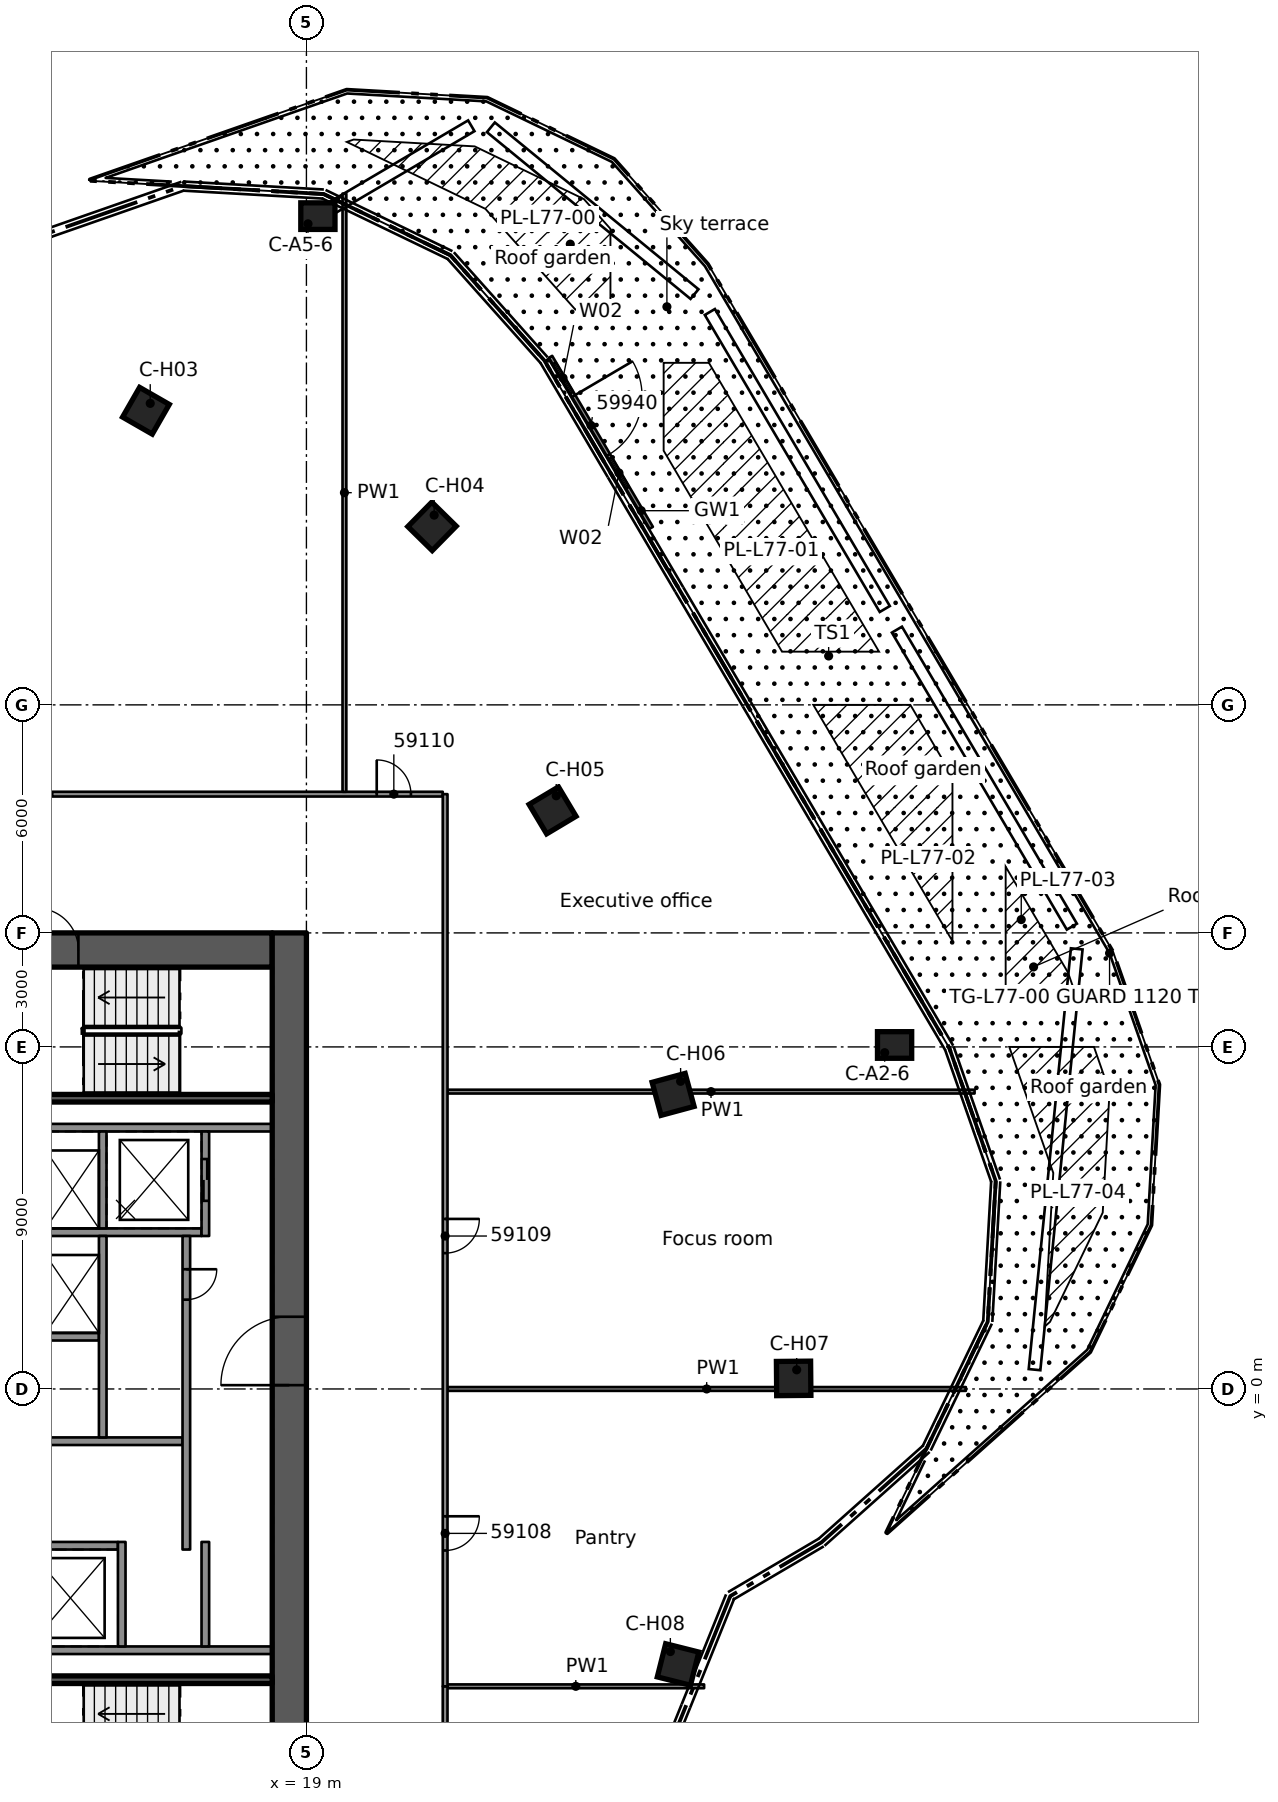
"""IFC4 building model, lengths in metres.
Left out: names, types, materials, properties, quantities, classifications, styles, units other than length and angle.
Written with IfcOpenShell. Run it as: python <this file> out.ifc"""

import sys

from ifc_helpers import new_model, si_unit, direction, frame, frame_2d, origin, origin_2d, place, context, subcontext, project, spatial, rectangle, extrude, element, fill, save


model = new_model("IFC4")
c1 = context("Model", 3, precision=1e-05, world=origin(), true_north=direction((0.0, 1.0)))
c2 = subcontext(c1, "Body", "Model", "MODEL_VIEW")
j1 = project(units=[si_unit("LENGTHUNIT", "METRE"), si_unit("PLANEANGLEUNIT", "RADIAN")], contexts=[c1])
p1 = place(None, origin())
s1 = spatial("IfcSite", under=j1, at=p1, CompositionType="ELEMENT")
p2 = place(p1, origin())
s2 = spatial("IfcBuilding", under=s1, at=p2, CompositionType="ELEMENT")
p3 = place(p2, frame((0.0, 0.0, 289.4)))
s3 = spatial("IfcBuildingStorey", under=s2, at=p3, CompositionType="ELEMENT", Elevation=289.4)
p4 = place(p3, frame((8.9, 11.55, 0.0), z_axis=(0.0, 0.0, 1.0), x_axis=(1.0, 0.0, 0.0)))
e1 = element("IfcWall", 1, at=p4, inside=s3, PredefinedType="SHEAR", context=c2, shape_type="SweptSolid", body=[
    extrude(rectangle(XDim=9.2, YDim=0.9, at=frame_2d((4.6, 0.0))), origin(), (0.0, 0.0, 1.0), 3.5),
])
p5 = place(p4, frame((3.0, 0.0, 0.0)))
e2 = element("IfcOpeningElement", 2, at=p5, cuts=e1, PredefinedType="OPENING", context=c2, shape_type="SweptSolid", body=[
    extrude(rectangle(XDim=1.1, YDim=2.1, at=frame_2d((0.55, 1.05))), frame((0.0, 0.46, 0.0), z_axis=(0.0, -1.0, 0.0), x_axis=(1.0, 0.0, 0.0)), (0.0, 0.0, 1.0), 0.92),
])
p6 = place(p4, frame((0.77, 0.0, 0.0)))
e3 = element("IfcOpeningElement", 3, at=p6, cuts=e1, PredefinedType="OPENING", context=c2, shape_type="SweptSolid", body=[
    extrude(rectangle(XDim=0.9, YDim=2.1, at=frame_2d((0.45, 1.05))), frame((0.0, 0.46, 0.0), z_axis=(0.0, -1.0, 0.0), x_axis=(1.0, 0.0, 0.0)), (0.0, 0.0, 1.0), 0.92),
])
p7 = place(p3, frame((18.55, -12.0, 0.0), z_axis=(0.0, 0.0, 1.0), x_axis=(0.0, 1.0, 0.0)))
e4 = element("IfcWall", 4, at=p7, inside=s3, PredefinedType="SHEAR", context=c2, shape_type="SweptSolid", body=[
    extrude(rectangle(XDim=24.0, YDim=0.9, at=frame_2d((12.0, 0.0))), origin(), (0.0, 0.0, 1.0), 3.5),
])
p8 = place(p7, frame((12.1, 0.0, 0.0)))
e5 = element("IfcOpeningElement", 5, at=p8, cuts=e4, PredefinedType="OPENING", context=c2, shape_type="SweptSolid", body=[
    extrude(rectangle(XDim=1.8, YDim=2.1, at=frame_2d((0.9, 1.05))), frame((0.0, 0.46, 0.0), z_axis=(0.0, -1.0, 0.0), x_axis=(1.0, 0.0, 0.0)), (0.0, 0.0, 1.0), 0.92),
])
for number, where, z_axis, x_axis in (
    (6, (34.477, 9.051, 0.0), (0.0, 0.0, 1.0), (1.0, 0.0, 0.0)),
    (7, (19.302, 30.86, 0.0), (0.0, 0.0, 1.0), (1.0, 0.0, 0.0)),
):
    element("IfcColumn", number, at=place(p3, frame(where, z_axis=z_axis, x_axis=x_axis)), inside=s3, PredefinedType="COLUMN", context=c2, shape_type="SweptSolid", body=[
        extrude(rectangle(XDim=0.9, YDim=0.7, at=origin_2d()), origin(), (0.0, 0.0, 1.0), 3.5),
    ])
for number, where, z_axis, x_axis in (
    (8, (14.777, 25.739, 0.0), (0.0, 0.0, 1.0), (0.498, 0.867, 0.0)),
    (9, (22.305, 22.697, 0.0), (0.0, 0.0, 1.0), (0.701, 0.713, 0.0)),
    (10, (25.477, 15.224, 0.0), (0.0, 0.0, 1.0), (0.858, 0.513, 0.0)),
    (11, (28.649, 7.751, 0.0), (0.0, 0.0, 1.0), (0.965, 0.261, 0.0)),
    (12, (31.821, 0.278, 0.0), (0.0, 0.0, 1.0), (1.0, 0.009, 0.0)),
    (13, (28.78, -7.25, 0.0), (0.0, 0.0, 1.0), (0.97, -0.244, 0.0)),
):
    element("IfcColumn", number, at=place(p3, frame(where, z_axis=z_axis, x_axis=x_axis)), inside=s3, PredefinedType="COLUMN", context=c2, shape_type="SweptSolid", body=[
        extrude(rectangle(XDim=0.9, YDim=0.9, at=origin_2d()), origin(), (0.0, 0.0, 1.0), 3.5),
    ])
for number, where, z_axis, x_axis in (
    (14, (11.54, -6.875, 0.0), (0.0, 0.0, 1.0), (1.0, 0.0, 0.0)),
    (15, (11.54, 6.875, 0.0), (0.0, 0.0, 1.0), (1.0, 0.0, 0.0)),
):
    element("IfcWall", number, at=place(p3, frame(where, z_axis=z_axis, x_axis=x_axis)), inside=s3, PredefinedType="SOLIDWALL", context=c2, shape_type="SweptSolid", body=[
        extrude(rectangle(XDim=6.56, YDim=0.2, at=frame_2d((3.28, 0.0))), origin(), (0.0, 0.0, 1.0), 3.09),
    ])
p9 = place(p3, frame((11.54, 4.125, 0.0), z_axis=(0.0, 0.0, 1.0), x_axis=(1.0, 0.0, 0.0)))
e16 = element("IfcWall", 16, at=p9, inside=s3, PredefinedType="SOLIDWALL", context=c2, shape_type="SweptSolid", body=[
    extrude(rectangle(XDim=4.7, YDim=0.2, at=frame_2d((2.35, 0.0))), origin(), (0.0, 0.0, 1.0), 3.09),
])
p10 = place(p3, frame((11.54, 1.375, 0.0), z_axis=(0.0, 0.0, 1.0), x_axis=(1.0, 0.0, 0.0)))
e17 = element("IfcWall", 17, at=p10, inside=s3, PredefinedType="SOLIDWALL", context=c2, shape_type="SweptSolid", body=[
    extrude(rectangle(XDim=2.0, YDim=0.2, at=frame_2d((1.0, 0.0))), origin(), (0.0, 0.0, 1.0), 3.09),
])
p11 = place(p3, frame((11.54, -1.375, 0.0), z_axis=(0.0, 0.0, 1.0), x_axis=(1.0, 0.0, 0.0)))
e18 = element("IfcWall", 18, at=p11, inside=s3, PredefinedType="SOLIDWALL", context=c2, shape_type="SweptSolid", body=[
    extrude(rectangle(XDim=4.2, YDim=0.2, at=frame_2d((2.1, 0.0))), origin(), (0.0, 0.0, 1.0), 3.09),
])
p12 = place(p3, frame((11.54, -4.125, 0.0), z_axis=(0.0, 0.0, 1.0), x_axis=(1.0, 0.0, 0.0)))
e19 = element("IfcWall", 19, at=p12, inside=s3, PredefinedType="SOLIDWALL", context=c2, shape_type="SweptSolid", body=[
    extrude(rectangle(XDim=2.5, YDim=0.2, at=frame_2d((1.25, 0.0))), origin(), (0.0, 0.0, 1.0), 3.09),
])
p13 = place(p3, frame((13.64, 6.775, 0.0), z_axis=(0.0, 0.0, 1.0), x_axis=(0.0, -1.0, 0.0)))
e20 = element("IfcWall", 20, at=p13, inside=s3, PredefinedType="SOLIDWALL", context=c2, shape_type="SweptSolid", body=[
    extrude(rectangle(XDim=2.55, YDim=0.2, at=frame_2d((1.275, 0.0))), origin(), (0.0, 0.0, 1.0), 3.09),
])
p14 = place(p3, frame((13.64, 4.025, 0.0), z_axis=(0.0, 0.0, 1.0), x_axis=(0.0, -1.0, 0.0)))
e21 = element("IfcWall", 21, at=p14, inside=s3, PredefinedType="SOLIDWALL", context=c2, shape_type="SweptSolid", body=[
    extrude(rectangle(XDim=5.3, YDim=0.2, at=frame_2d((2.65, 0.0))), origin(), (0.0, 0.0, 1.0), 3.09),
])
p15 = place(p3, frame((14.14, -4.025, 0.0), z_axis=(0.0, 0.0, 1.0), x_axis=(0.0, -1.0, 0.0)))
e22 = element("IfcWall", 22, at=p15, inside=s3, PredefinedType="SOLIDWALL", context=c2, shape_type="SweptSolid", body=[
    extrude(rectangle(XDim=2.75, YDim=0.2, at=frame_2d((1.375, 0.0))), origin(), (0.0, 0.0, 1.0), 3.09),
])
p16 = place(p3, frame((16.34, 6.775, 0.0), z_axis=(0.0, 0.0, 1.0), x_axis=(0.0, -1.0, 0.0)))
e23 = element("IfcWall", 23, at=p16, inside=s3, PredefinedType="SOLIDWALL", context=c2, shape_type="SweptSolid", body=[
    extrude(rectangle(XDim=2.75, YDim=0.2, at=frame_2d((1.375, 0.0))), origin(), (0.0, 0.0, 1.0), 3.09),
])
p17 = place(p16, frame((0.725, 0.0, 0.0)))
e24 = element("IfcOpeningElement", 24, at=p17, cuts=e23, PredefinedType="OPENING", context=c2, shape_type="SweptSolid", body=[
    extrude(rectangle(XDim=1.1, YDim=2.1, at=frame_2d((0.55, 1.05))), frame((0.0, 0.11, 0.0), z_axis=(0.0, -1.0, 0.0), x_axis=(1.0, 0.0, 0.0)), (0.0, 0.0, 1.0), 0.22),
])
p18 = place(p3, frame((15.84, 4.025, 0.0), z_axis=(0.0, 0.0, 1.0), x_axis=(0.0, -1.0, 0.0)))
e25 = element("IfcWall", 25, at=p18, inside=s3, PredefinedType="SOLIDWALL", context=c2, shape_type="SweptSolid", body=[
    extrude(rectangle(XDim=8.25, YDim=0.2, at=frame_2d((4.125, 0.0))), origin(), (0.0, 0.0, 1.0), 3.09),
])
p19 = place(p18, frame((0.875, 0.0, 0.0)))
e26 = element("IfcOpeningElement", 26, at=p19, cuts=e25, PredefinedType="OPENING", context=c2, shape_type="SweptSolid", body=[
    extrude(rectangle(XDim=0.8, YDim=2.1, at=frame_2d((0.4, 1.05))), frame((0.0, 0.11, 0.0), z_axis=(0.0, -1.0, 0.0), x_axis=(1.0, 0.0, 0.0)), (0.0, 0.0, 1.0), 0.22),
])
p20 = place(p3, frame((16.34, -4.025, 0.0), z_axis=(0.0, 0.0, 1.0), x_axis=(0.0, -1.0, 0.0)))
e27 = element("IfcWall", 27, at=p20, inside=s3, PredefinedType="SOLIDWALL", context=c2, shape_type="SweptSolid", body=[
    extrude(rectangle(XDim=2.75, YDim=0.2, at=frame_2d((1.375, 0.0))), origin(), (0.0, 0.0, 1.0), 3.09),
])
for number, where, z_axis, x_axis in (
    (28, (11.54, -7.65, 0.0), (0.0, 0.0, 1.0), (1.0, 0.0, 0.0)),
    (29, (11.54, 7.65, 0.0), (0.0, 0.0, 1.0), (1.0, 0.0, 0.0)),
):
    element("IfcWall", number, at=place(p3, frame(where, z_axis=z_axis, x_axis=x_axis)), inside=s3, PredefinedType="SOLIDWALL", context=c2, shape_type="SweptSolid", body=[
        extrude(rectangle(XDim=6.56, YDim=0.2, at=frame_2d((3.28, 0.0))), origin(), (0.0, 0.0, 1.0), 3.09),
    ])
p21 = place(p3, frame((25.424, 27.159, 0.0), z_axis=(0.0, 0.0, 1.0), x_axis=(0.507520639253, -0.861639600258, 0.0)))
e30 = element("IfcWall", 30, at=p21, inside=s3, PredefinedType="STANDARD", context=c2, shape_type="SweptSolid", body=[
    extrude(rectangle(XDim=5.222, YDim=0.1, at=frame_2d((2.611, 0.0))), origin(), (0.0, 0.0, 1.0), 3.18),
])
p22 = place(p21, frame((1.197, 0.0, 0.0)))
e31 = element("IfcOpeningElement", 31, at=p22, cuts=e30, PredefinedType="OPENING", context=c2, shape_type="SweptSolid", body=[
    extrude(rectangle(XDim=1.8, YDim=2.4, at=frame_2d((0.9, 1.2))), frame((0.0, 0.06, 0.0), z_axis=(0.0, -1.0, 0.0), x_axis=(1.0, 0.0, 0.0)), (0.0, 0.0, 1.0), 0.12),
])
p23 = place(p21, frame((0.197, 0.0, 0.0)))
e32 = element("IfcOpeningElement", 32, at=p23, cuts=e30, PredefinedType="OPENING", context=c2, shape_type="SweptSolid", body=[
    extrude(rectangle(XDim=0.9, YDim=2.4, at=frame_2d((0.45, 1.2))), frame((0.0, 0.06, 0.0), z_axis=(0.0, -1.0, 0.0), x_axis=(1.0, 0.0, 0.0)), (0.0, 0.0, 1.0), 0.12),
])
p24 = place(p21, frame((3.096, 0.0, 0.0)))
e33 = element("IfcOpeningElement", 33, at=p24, cuts=e30, PredefinedType="OPENING", context=c2, shape_type="SweptSolid", body=[
    extrude(rectangle(XDim=0.9, YDim=2.4, at=frame_2d((0.45, 1.2))), frame((0.0, 0.06, 0.0), z_axis=(0.0, -1.0, 0.0), x_axis=(1.0, 0.0, 0.0)), (0.0, 0.0, 1.0), 0.12),
])
p25 = place(p3, frame((22.712, -7.824, 0.0), z_axis=(0.0, 0.0, 1.0), x_axis=(1.0, 0.0, 0.0)))
e34 = element("IfcWall", 34, at=p25, inside=s3, PredefinedType="PARTITIONING", context=c2, shape_type="SweptSolid", body=[
    extrude(rectangle(XDim=6.753, YDim=0.1, at=frame_2d((3.376, 0.0))), origin(), (0.0, 0.0, 1.0), 3.15),
])
p26 = place(p3, frame((22.712, 0.0, 0.0), z_axis=(0.0, 0.0, 1.0), x_axis=(1.0, 0.0, 0.0)))
e35 = element("IfcWall", 35, at=p26, inside=s3, PredefinedType="PARTITIONING", context=c2, shape_type="SweptSolid", body=[
    extrude(rectangle(XDim=13.641, YDim=0.1, at=frame_2d((6.821, 0.0))), origin(), (0.0, 0.0, 1.0), 3.15),
])
p27 = place(p3, frame((22.712, 7.824, 0.0), z_axis=(0.0, 0.0, 1.0), x_axis=(1.0, 0.0, 0.0)))
e36 = element("IfcWall", 36, at=p27, inside=s3, PredefinedType="PARTITIONING", context=c2, shape_type="SweptSolid", body=[
    extrude(rectangle(XDim=13.87, YDim=0.1, at=frame_2d((6.935, 0.0))), origin(), (0.0, 0.0, 1.0), 3.15),
])
p28 = place(p3, frame((12.311, 15.651, 0.0), z_axis=(0.0, 0.0, 1.0), x_axis=(1.0, 0.0, 0.0)))
e37 = element("IfcWall", 37, at=p28, inside=s3, PredefinedType="PARTITIONING", context=c2, shape_type="SweptSolid", body=[
    extrude(rectangle(XDim=10.276, YDim=0.125, at=frame_2d((5.138, 0.0))), origin(), (0.0, 0.0, 1.0), 3.15),
])
p29 = place(p28, frame((8.539, 0.0, 0.0)))
e38 = element("IfcOpeningElement", 38, at=p29, cuts=e37, PredefinedType="OPENING", context=c2, shape_type="SweptSolid", body=[
    extrude(rectangle(XDim=0.9, YDim=2.1, at=frame_2d((0.45, 1.05))), frame((0.0, 0.073, 0.0), z_axis=(0.0, -1.0, 0.0), x_axis=(1.0, 0.0, 0.0)), (0.0, 0.0, 1.0), 0.145),
])
p30 = place(p3, frame((22.65, -7.824, 0.0), z_axis=(0.0, 0.0, 1.0), x_axis=(0.0, -1.0, 0.0)))
e39 = element("IfcWall", 39, at=p30, inside=s3, PredefinedType="PARTITIONING", context=c2, shape_type="SweptSolid", body=[
    extrude(rectangle(XDim=7.827, YDim=0.125, at=frame_2d((3.914, 0.0))), origin(), (0.0, 0.0, 1.0), 3.15),
])
p31 = place(p30, frame((3.35, 0.0, 0.0)))
e40 = element("IfcOpeningElement", 40, at=p31, cuts=e39, PredefinedType="OPENING", context=c2, shape_type="SweptSolid", body=[
    extrude(rectangle(XDim=0.9, YDim=2.1, at=frame_2d((0.45, 1.05))), frame((0.0, 0.073, 0.0), z_axis=(0.0, -1.0, 0.0), x_axis=(1.0, 0.0, 0.0)), (0.0, 0.0, 1.0), 0.145),
])
p32 = place(p3, frame((22.65, 15.651, 0.0), z_axis=(0.0, 0.0, 1.0), x_axis=(0.0, -1.0, 0.0)))
e41 = element("IfcWall", 41, at=p32, inside=s3, PredefinedType="PARTITIONING", context=c2, shape_type="SweptSolid", body=[
    extrude(rectangle(XDim=23.475, YDim=0.125, at=frame_2d((11.737, 0.0))), origin(), (0.0, 0.0, 1.0), 3.15),
])
p33 = place(p32, frame((19.001, 0.0, 0.0)))
e42 = element("IfcOpeningElement", 42, at=p33, cuts=e41, PredefinedType="OPENING", context=c2, shape_type="SweptSolid", body=[
    extrude(rectangle(XDim=0.9, YDim=2.1, at=frame_2d((0.45, 1.05))), frame((0.0, 0.073, 0.0), z_axis=(0.0, -1.0, 0.0), x_axis=(1.0, 0.0, 0.0)), (0.0, 0.0, 1.0), 0.145),
])
p34 = place(p32, frame((11.177, 0.0, 0.0)))
e43 = element("IfcOpeningElement", 43, at=p34, cuts=e41, PredefinedType="OPENING", context=c2, shape_type="SweptSolid", body=[
    extrude(rectangle(XDim=0.9, YDim=2.1, at=frame_2d((0.45, 1.05))), frame((0.0, 0.073, 0.0), z_axis=(0.0, -1.0, 0.0), x_axis=(1.0, 0.0, 0.0)), (0.0, 0.0, 1.0), 0.145),
])
p35 = place(p3, frame((20.0, 15.713, 0.0), z_axis=(0.0, 0.0, 1.0), x_axis=(0.0, 1.0, 0.0)))
e44 = element("IfcWall", 44, at=p35, inside=s3, PredefinedType="PARTITIONING", context=c2, shape_type="SweptSolid", body=[
    extrude(rectangle(XDim=15.741, YDim=0.1, at=frame_2d((7.871, 0.0))), origin(), (0.0, 0.0, 1.0), 3.15),
])
p36 = place(p17, origin())
e45 = element("IfcDoor", 45, at=p36, inside=s3, OperationType="DOUBLE_DOOR_SLIDING", PredefinedType="DOOR", context=c2, shape_type="SweptSolid", body=[
    extrude(rectangle(XDim=1.1, YDim=2.1, at=frame_2d((0.55, 1.05))), frame((0.0, 0.025, 0.0), z_axis=(0.0, -1.0, 0.0), x_axis=(1.0, 0.0, 0.0)), (0.0, 0.0, 1.0), 0.05),
])
fill(e24, e45)
p37 = place(p19, origin())
e46 = element("IfcDoor", 46, at=p37, inside=s3, OperationType="SINGLE_SWING_LEFT", PredefinedType="DOOR", context=c2, shape_type="SweptSolid", body=[
    extrude(rectangle(XDim=0.8, YDim=2.1, at=frame_2d((0.4, 1.05))), frame((0.0, 0.025, 0.0), z_axis=(0.0, -1.0, 0.0), x_axis=(1.0, 0.0, 0.0)), (0.0, 0.0, 1.0), 0.05),
])
fill(e26, e46)
p38 = place(p8, origin())
e47 = element("IfcDoor", 47, at=p38, inside=s3, OperationType="SINGLE_SWING_RIGHT", PredefinedType="DOOR", context=c2, shape_type="SweptSolid", body=[
    extrude(rectangle(XDim=1.8, YDim=2.1, at=frame_2d((0.9, 1.05))), frame((0.0, 0.025, 0.0), z_axis=(0.0, -1.0, 0.0), x_axis=(1.0, 0.0, 0.0)), (0.0, 0.0, 1.0), 0.05),
])
fill(e5, e47)
p39 = place(p5, origin())
e48 = element("IfcDoor", 48, at=p39, inside=s3, OperationType="SINGLE_SWING_LEFT", PredefinedType="DOOR", context=c2, shape_type="SweptSolid", body=[
    extrude(rectangle(XDim=1.1, YDim=2.1, at=frame_2d((0.55, 1.05))), frame((0.0, 0.025, 0.0), z_axis=(0.0, -1.0, 0.0), x_axis=(1.0, 0.0, 0.0)), (0.0, 0.0, 1.0), 0.05),
])
fill(e2, e48)
p40 = place(p22, origin())
e49 = element("IfcDoor", 49, at=p40, inside=s3, OperationType="DOUBLE_DOOR_SINGLE_SWING", PredefinedType="DOOR", context=c2, shape_type="SweptSolid", body=[
    extrude(rectangle(XDim=1.8, YDim=2.4, at=frame_2d((0.9, 1.2))), frame((0.0, 0.025, 0.0), z_axis=(0.0, -1.0, 0.0), x_axis=(1.0, 0.0, 0.0)), (0.0, 0.0, 1.0), 0.05),
])
fill(e31, e49)
p41 = place(p23, origin())
e50 = element("IfcWindow", 50, at=p41, inside=s3, PartitioningType="SINGLE_PANEL", PredefinedType="WINDOW", context=c2, shape_type="SweptSolid", body=[
    extrude(rectangle(XDim=0.9, YDim=2.4, at=frame_2d((0.45, 1.2))), frame((0.0, 0.03, 0.0), z_axis=(0.0, -1.0, 0.0), x_axis=(1.0, 0.0, 0.0)), (0.0, 0.0, 1.0), 0.06),
])
fill(e32, e50)
p42 = place(p24, origin())
e51 = element("IfcWindow", 51, at=p42, inside=s3, PartitioningType="SINGLE_PANEL", PredefinedType="WINDOW", context=c2, shape_type="SweptSolid", body=[
    extrude(rectangle(XDim=0.9, YDim=2.4, at=frame_2d((0.45, 1.2))), frame((0.0, 0.03, 0.0), z_axis=(0.0, -1.0, 0.0), x_axis=(1.0, 0.0, 0.0)), (0.0, 0.0, 1.0), 0.06),
])
fill(e33, e51)
p43 = place(p33, origin())
e52 = element("IfcDoor", 52, at=p43, inside=s3, OperationType="SINGLE_SWING_RIGHT", PredefinedType="DOOR", context=c2, shape_type="SweptSolid", body=[
    extrude(rectangle(XDim=0.9, YDim=2.1, at=frame_2d((0.45, 1.05))), frame((0.0, 0.025, 0.0), z_axis=(0.0, -1.0, 0.0), x_axis=(1.0, 0.0, 0.0)), (0.0, 0.0, 1.0), 0.05),
])
fill(e42, e52)
p44 = place(p34, origin())
e53 = element("IfcDoor", 53, at=p44, inside=s3, OperationType="SINGLE_SWING_LEFT", PredefinedType="DOOR", context=c2, shape_type="SweptSolid", body=[
    extrude(rectangle(XDim=0.9, YDim=2.1, at=frame_2d((0.45, 1.05))), frame((0.0, 0.025, 0.0), z_axis=(0.0, -1.0, 0.0), x_axis=(1.0, 0.0, 0.0)), (0.0, 0.0, 1.0), 0.05),
])
fill(e43, e53)
p45 = place(p29, origin())
e54 = element("IfcDoor", 54, at=p45, inside=s3, OperationType="SINGLE_SWING_RIGHT", PredefinedType="DOOR", context=c2, shape_type="SweptSolid", body=[
    extrude(rectangle(XDim=0.9, YDim=2.1, at=frame_2d((0.45, 1.05))), frame((0.0, 0.025, 0.0), z_axis=(0.0, -1.0, 0.0), x_axis=(1.0, 0.0, 0.0)), (0.0, 0.0, 1.0), 0.05),
])
fill(e38, e54)
save(model, sys.argv[1])
